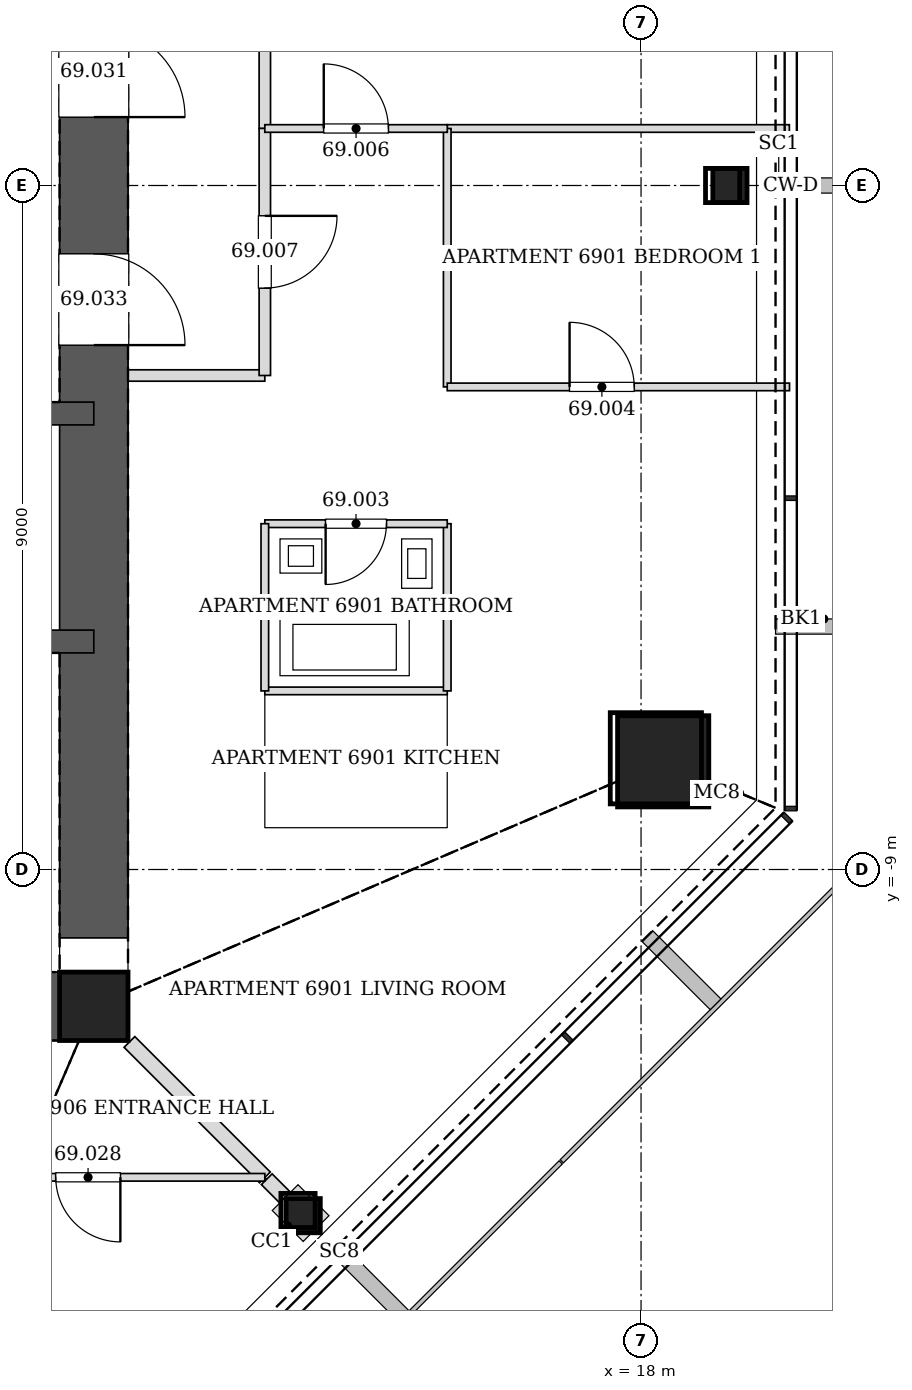
"""IFC4 building model, lengths in metres.
Left out: names, types, materials, properties, quantities, classifications, styles, units other than length and angle.
Written with IfcOpenShell. Run it as: python <this file> out.ifc"""

import sys

from ifc_helpers import new_model, si_unit, direction, frame, frame_2d, origin, origin_2d, place, context, subcontext, project, spatial, rectangle, hollow_rectangle, extrude, element, fill, save


model = new_model("IFC4")
c1 = context("Model", 3, precision=1e-05, world=origin(), true_north=direction((0.0, 1.0)))
c2 = subcontext(c1, "Body", "Model", "MODEL_VIEW")
j1 = project(units=[si_unit("LENGTHUNIT", "METRE"), si_unit("PLANEANGLEUNIT", "RADIAN")], contexts=[c1])
p1 = place(None, origin())
s1 = spatial("IfcSite", under=j1, at=p1, CompositionType="ELEMENT")
p2 = place(p1, origin())
s2 = spatial("IfcBuilding", under=s1, at=p2, CompositionType="ELEMENT")
p3 = place(p2, frame((0.0, 0.0, 284.4)))
s3 = spatial("IfcBuildingStorey", under=s2, at=p3, CompositionType="ELEMENT", Elevation=284.4)
p4 = place(p3, frame((18.291, -7.576, 0.0), z_axis=(-0.028277121884, 0.011698403216, 0.999531666202), x_axis=(-0.382282742426, -0.924045401938, 0.0)))
e1 = element("IfcColumn", 1, at=p4, inside=s3, PredefinedType="COLUMN", context=c2, shape_type="SweptSolid", body=[
    extrude(hollow_rectangle(XDim=1.2, YDim=1.2, WallThickness=0.055, at=origin_2d()), origin(), (0.0, 0.0, 1.0), 3.402),
])
for number, where, z_axis, x_axis in (
    (2, (19.169, 0.0, 0.0), (-0.028, 0.0, 1.0), (0.0, -1.0, 0.0)),
    (3, (13.555, -13.555, 0.0), (-0.02, 0.02, 1.0), (-0.707, -0.707, 0.0)),
):
    element("IfcColumn", number, at=place(p3, frame(where, z_axis=z_axis, x_axis=x_axis)), inside=s3, PredefinedType="COLUMN", context=c2, shape_type="SweptSolid", body=[
        extrude(hollow_rectangle(XDim=0.45, YDim=0.45, WallThickness=0.02, at=origin_2d()), origin(), (0.0, 0.0, 1.0), 3.402),
    ])
p5 = place(p3, frame((10.8, -10.8, 0.0), z_axis=(0.0, 0.0, 1.0), x_axis=(1.0, 0.0, 0.0)))
e4 = element("IfcColumn", 4, at=p5, inside=s3, PredefinedType="COLUMN", context=c2, shape_type="SweptSolid", body=[
    extrude(hollow_rectangle(XDim=0.9, YDim=0.9, WallThickness=0.04, at=origin_2d()), origin(), (0.0, 0.0, 1.0), 3.4),
])
p6 = place(p3, frame((-10.8, -10.8, 0.0), z_axis=(0.0, 0.0, 1.0), x_axis=(1.0, 0.0, 0.0)))
e5 = element("IfcWall", 5, at=p6, inside=s3, PredefinedType="SOLIDWALL", context=c2, shape_type="SweptSolid", body=[
    extrude(rectangle(XDim=21.6, YDim=0.9, at=frame_2d((10.8, 0.0))), origin(), (0.0, 0.0, 1.0), 3.4),
])
p7 = place(p6, frame((10.05, 0.0, 0.0)))
e6 = element("IfcOpeningElement", 6, at=p7, cuts=e5, PredefinedType="OPENING", context=c2, shape_type="SweptSolid", body=[
    extrude(rectangle(XDim=1.5, YDim=2.1, at=frame_2d((0.75, 1.05))), frame((0.0, 0.46, 0.0), z_axis=(0.0, -1.0, 0.0), x_axis=(1.0, 0.0, 0.0)), (0.0, 0.0, 1.0), 0.92),
])
p8 = place(p6, frame((17.1, 0.0, 0.0)))
e7 = element("IfcOpeningElement", 7, at=p8, cuts=e5, PredefinedType="OPENING", context=c2, shape_type="SweptSolid", body=[
    extrude(rectangle(XDim=0.9, YDim=2.1, at=frame_2d((0.45, 1.05))), frame((0.0, 0.46, 0.0), z_axis=(0.0, -1.0, 0.0), x_axis=(1.0, 0.0, 0.0)), (0.0, 0.0, 1.0), 0.92),
])
p9 = place(p3, frame((10.8, -10.8, 0.0), z_axis=(0.0, 0.0, 1.0), x_axis=(0.0, 1.0, 0.0)))
e8 = element("IfcWall", 8, at=p9, inside=s3, PredefinedType="SOLIDWALL", context=c2, shape_type="SweptSolid", body=[
    extrude(rectangle(XDim=21.6, YDim=0.9, at=frame_2d((10.8, 0.0))), origin(), (0.0, 0.0, 1.0), 3.4),
])
p10 = place(p9, frame((11.7, 0.0, 0.0)))
e9 = element("IfcOpeningElement", 9, at=p10, cuts=e8, PredefinedType="OPENING", context=c2, shape_type="SweptSolid", body=[
    extrude(rectangle(XDim=1.2, YDim=2.1, at=frame_2d((0.6, 1.05))), frame((0.0, 0.46, 0.0), z_axis=(0.0, -1.0, 0.0), x_axis=(1.0, 0.0, 0.0)), (0.0, 0.0, 1.0), 0.92),
])
p11 = place(p9, frame((8.7, 0.0, 0.0)))
e10 = element("IfcOpeningElement", 10, at=p11, cuts=e8, PredefinedType="OPENING", context=c2, shape_type="SweptSolid", body=[
    extrude(rectangle(XDim=1.2, YDim=2.1, at=frame_2d((0.6, 1.05))), frame((0.0, 0.46, 0.0), z_axis=(0.0, -1.0, 0.0), x_axis=(1.0, 0.0, 0.0)), (0.0, 0.0, 1.0), 0.92),
])
p12 = place(p3, frame((-10.8, -3.0, 0.0), z_axis=(0.0, 0.0, 1.0), x_axis=(1.0, 0.0, 0.0)))
e11 = element("IfcWall", 11, at=p12, inside=s3, PredefinedType="SOLIDWALL", context=c2, shape_type="SweptSolid", body=[
    extrude(rectangle(XDim=21.6, YDim=0.3, at=frame_2d((10.8, 0.0))), origin(), (0.0, 0.0, 1.0), 3.4),
])
p13 = place(p12, frame((13.25, 0.0, 0.0)))
e12 = element("IfcOpeningElement", 12, at=p13, cuts=e11, PredefinedType="OPENING", context=c2, shape_type="SweptSolid", body=[
    extrude(rectangle(XDim=0.9, YDim=2.1, at=frame_2d((0.45, 1.05))), frame((0.0, 0.16, 0.0), z_axis=(0.0, -1.0, 0.0), x_axis=(1.0, 0.0, 0.0)), (0.0, 0.0, 1.0), 0.32),
])
p14 = place(p12, frame((1.65, 0.0, 0.0)))
e13 = element("IfcOpeningElement", 13, at=p14, cuts=e11, PredefinedType="OPENING", context=c2, shape_type="SweptSolid", body=[
    extrude(rectangle(XDim=0.9, YDim=2.1, at=frame_2d((0.45, 1.05))), frame((0.0, 0.16, 0.0), z_axis=(0.0, -1.0, 0.0), x_axis=(1.0, 0.0, 0.0)), (0.0, 0.0, 1.0), 0.32),
])
p15 = place(p12, frame((4.55, 0.0, 0.0)))
e14 = element("IfcOpeningElement", 14, at=p15, cuts=e11, PredefinedType="OPENING", context=c2, shape_type="SweptSolid", body=[
    extrude(rectangle(XDim=0.9, YDim=2.1, at=frame_2d((0.45, 1.05))), frame((0.0, 0.16, 0.0), z_axis=(0.0, -1.0, 0.0), x_axis=(1.0, 0.0, 0.0)), (0.0, 0.0, 1.0), 0.32),
])
p16 = place(p12, frame((7.45, 0.0, 0.0)))
e15 = element("IfcOpeningElement", 15, at=p16, cuts=e11, PredefinedType="OPENING", context=c2, shape_type="SweptSolid", body=[
    extrude(rectangle(XDim=0.9, YDim=2.1, at=frame_2d((0.45, 1.05))), frame((0.0, 0.16, 0.0), z_axis=(0.0, -1.0, 0.0), x_axis=(1.0, 0.0, 0.0)), (0.0, 0.0, 1.0), 0.32),
])
p17 = place(p12, frame((16.05, 0.0, 0.0)))
e16 = element("IfcOpeningElement", 16, at=p17, cuts=e11, PredefinedType="OPENING", context=c2, shape_type="SweptSolid", body=[
    extrude(rectangle(XDim=1.1, YDim=2.1, at=frame_2d((0.55, 1.05))), frame((0.0, 0.16, 0.0), z_axis=(0.0, -1.0, 0.0), x_axis=(1.0, 0.0, 0.0)), (0.0, 0.0, 1.0), 0.32),
])
p18 = place(p12, frame((18.95, 0.0, 0.0)))
e17 = element("IfcOpeningElement", 17, at=p18, cuts=e11, PredefinedType="OPENING", context=c2, shape_type="SweptSolid", body=[
    extrude(rectangle(XDim=1.1, YDim=2.1, at=frame_2d((0.55, 1.05))), frame((0.0, 0.16, 0.0), z_axis=(0.0, -1.0, 0.0), x_axis=(1.0, 0.0, 0.0)), (0.0, 0.0, 1.0), 0.32),
])
p19 = place(p3, frame((-10.8, -6.0, 0.0), z_axis=(0.0, 0.0, 1.0), x_axis=(1.0, 0.0, 0.0)))
e18 = element("IfcWall", 18, at=p19, inside=s3, PredefinedType="SOLIDWALL", context=c2, shape_type="SweptSolid", body=[
    extrude(rectangle(XDim=21.6, YDim=0.3, at=frame_2d((10.8, 0.0))), origin(), (0.0, 0.0, 1.0), 3.4),
])
p20 = place(p19, frame((10.25, 0.0, 0.0)))
e19 = element("IfcOpeningElement", 19, at=p20, cuts=e18, PredefinedType="OPENING", context=c2, shape_type="SweptSolid", body=[
    extrude(rectangle(XDim=1.1, YDim=2.1, at=frame_2d((0.55, 1.05))), frame((0.0, 0.16, 0.0), z_axis=(0.0, -1.0, 0.0), x_axis=(1.0, 0.0, 0.0)), (0.0, 0.0, 1.0), 0.32),
])
p21 = place(p3, frame((13.05, 0.749, 0.0), z_axis=(0.0, 0.0, 1.0), x_axis=(0.0, 1.0, 0.0)))
e20 = element("IfcWall", 20, at=p21, inside=s3, PredefinedType="PARTITIONING", context=c2, shape_type="SweptSolid", body=[
    extrude(rectangle(XDim=1.502, YDim=0.15, at=frame_2d((0.751, 0.0))), origin(), (0.0, 0.0, 1.0), 3.2),
])
p22 = place(p3, frame((11.25, -2.5, 0.0), z_axis=(0.0, 0.0, 1.0), x_axis=(1.0, 0.0, 0.0)))
e21 = element("IfcWall", 21, at=p22, inside=s3, PredefinedType="PARTITIONING", context=c2, shape_type="SweptSolid", body=[
    extrude(rectangle(XDim=1.8, YDim=0.15, at=frame_2d((0.9, 0.0))), origin(), (0.0, 0.0, 1.0), 3.2),
])
p23 = place(p3, frame((13.05, -2.5, 0.0), z_axis=(0.0, 0.0, 1.0), x_axis=(0.0, 1.0, 0.0)))
e22 = element("IfcWall", 22, at=p23, inside=s3, PredefinedType="PARTITIONING", context=c2, shape_type="SweptSolid", body=[
    extrude(rectangle(XDim=3.251, YDim=0.15, at=frame_2d((1.625, 0.0))), origin(), (0.0, 0.0, 1.0), 2.349),
])
p24 = place(p23, frame((1.15, 0.0, 0.0)))
e23 = element("IfcOpeningElement", 23, at=p24, cuts=e22, PredefinedType="OPENING", context=c2, shape_type="SweptSolid", body=[
    extrude(rectangle(XDim=0.95, YDim=2.1, at=frame_2d((0.475, 1.05))), frame((0.0, 0.085, 0.0), z_axis=(0.0, -1.0, 0.0), x_axis=(1.0, 0.0, 0.0)), (0.0, 0.0, 1.0), 0.17),
])
p25 = place(p3, frame((15.45, -6.65, 0.0), z_axis=(0.0, 0.0, 1.0), x_axis=(-1.0, 0.0, 0.0)))
e24 = element("IfcWall", 24, at=p25, inside=s3, PredefinedType="PARTITIONING", context=c2, shape_type="SweptSolid", body=[
    extrude(rectangle(XDim=2.4, YDim=0.1, at=frame_2d((1.2, 0.0))), origin(), (0.0, 0.0, 1.0), 2.591),
])
p26 = place(p3, frame((15.45, -6.65, 0.0), z_axis=(0.0, 0.0, 1.0), x_axis=(0.0, 1.0, 0.0)))
e25 = element("IfcWall", 25, at=p26, inside=s3, PredefinedType="PARTITIONING", context=c2, shape_type="SweptSolid", body=[
    extrude(rectangle(XDim=2.2, YDim=0.1, at=frame_2d((1.1, 0.0))), origin(), (0.0, 0.0, 1.0), 3.2),
])
p27 = place(p3, frame((15.45, -4.45, 0.0), z_axis=(0.0, 0.0, 1.0), x_axis=(-1.0, 0.0, 0.0)))
e26 = element("IfcWall", 26, at=p27, inside=s3, PredefinedType="PARTITIONING", context=c2, shape_type="SweptSolid", body=[
    extrude(rectangle(XDim=2.4, YDim=0.1, at=frame_2d((1.2, 0.0))), origin(), (0.0, 0.0, 1.0), 2.591),
])
p28 = place(p27, frame((0.8, 0.0, 0.0)))
e27 = element("IfcOpeningElement", 27, at=p28, cuts=e26, PredefinedType="OPENING", context=c2, shape_type="SweptSolid", body=[
    extrude(rectangle(XDim=0.8, YDim=2.1, at=frame_2d((0.4, 1.05))), frame((0.0, 0.06, 0.0), z_axis=(0.0, -1.0, 0.0), x_axis=(1.0, 0.0, 0.0)), (0.0, 0.0, 1.0), 0.12),
])
p29 = place(p3, frame((13.05, -4.45, 0.0), z_axis=(0.0, 0.0, 1.0), x_axis=(0.0, -1.0, 0.0)))
e28 = element("IfcWall", 28, at=p29, inside=s3, PredefinedType="PARTITIONING", context=c2, shape_type="SweptSolid", body=[
    extrude(rectangle(XDim=2.2, YDim=0.1, at=frame_2d((1.1, 0.0))), origin(), (0.0, 0.0, 1.0), 3.2),
])
p30 = place(p3, frame((19.951, 0.75, 0.0), z_axis=(0.0, 0.0, 1.0), x_axis=(-1.0, 0.0, 0.0)))
e29 = element("IfcWall", 29, at=p30, inside=s3, PredefinedType="PARTITIONING", context=c2, shape_type="SweptSolid", body=[
    extrude(rectangle(XDim=4.501, YDim=0.1, at=frame_2d((2.251, 0.0))), origin(), (0.0, 0.0, 1.0), 2.591),
])
p31 = place(p3, frame((15.45, 0.75, 0.0), z_axis=(0.0, 0.0, 1.0), x_axis=(0.0, -1.0, 0.0)))
e30 = element("IfcWall", 30, at=p31, inside=s3, PredefinedType="PARTITIONING", context=c2, shape_type="SweptSolid", body=[
    extrude(rectangle(XDim=3.4, YDim=0.1, at=frame_2d((1.7, 0.0))), origin(), (0.0, 0.0, 1.0), 2.349),
])
p32 = place(p3, frame((15.45, -2.65, 0.0), z_axis=(0.0, 0.0, 1.0), x_axis=(1.0, 0.0, 0.0)))
e31 = element("IfcWall", 31, at=p32, inside=s3, PredefinedType="PARTITIONING", context=c2, shape_type="SweptSolid", body=[
    extrude(rectangle(XDim=4.503, YDim=0.1, at=frame_2d((2.252, 0.0))), origin(), (0.0, 0.0, 1.0), 2.591),
])
p33 = place(p32, frame((1.61, 0.0, 0.0)))
e32 = element("IfcOpeningElement", 32, at=p33, cuts=e31, PredefinedType="OPENING", context=c2, shape_type="SweptSolid", body=[
    extrude(rectangle(XDim=0.85, YDim=2.1, at=frame_2d((0.425, 1.05))), frame((0.0, 0.06, 0.0), z_axis=(0.0, -1.0, 0.0), x_axis=(1.0, 0.0, 0.0)), (0.0, 0.0, 1.0), 0.12),
])
p34 = place(p3, frame((13.05, 0.75, 0.0), z_axis=(0.0, 0.0, 1.0), x_axis=(1.0, 0.0, 0.0)))
e33 = element("IfcWall", 33, at=p34, inside=s3, PredefinedType="PARTITIONING", context=c2, shape_type="SweptSolid", body=[
    extrude(rectangle(XDim=2.401, YDim=0.1, at=frame_2d((1.2, 0.0))), origin(), (0.0, 0.0, 1.0), 2.591),
])
p35 = place(p34, frame((0.775, 0.0, 0.0)))
e34 = element("IfcOpeningElement", 34, at=p35, cuts=e33, PredefinedType="OPENING", context=c2, shape_type="SweptSolid", body=[
    extrude(rectangle(XDim=0.85, YDim=2.1, at=frame_2d((0.425, 1.05))), frame((0.0, 0.06, 0.0), z_axis=(0.0, -1.0, 0.0), x_axis=(1.0, 0.0, 0.0)), (0.0, 0.0, 1.0), 0.12),
])
p36 = place(p3, frame((13.075, -13.075, 0.0), z_axis=(0.0, 0.0, 1.0), x_axis=(0.707106781187, -0.707106781187, 0.0)))
e35 = element("IfcWall", 35, at=p36, inside=s3, PredefinedType="PARTITIONING", context=c2, shape_type="SweptSolid", body=[
    extrude(rectangle(XDim=0.338, YDim=0.2, at=frame_2d((0.169, 0.0))), origin(), (0.0, 0.0, 1.0), 2.591),
])
p37 = place(p3, frame((11.269, -11.269, 0.0), z_axis=(0.0, 0.0, 1.0), x_axis=(0.707106781187, -0.707106781187, 0.0)))
e36 = element("IfcWall", 36, at=p37, inside=s3, PredefinedType="PARTITIONING", context=c2, shape_type="SweptSolid", body=[
    extrude(rectangle(XDim=2.52, YDim=0.2, at=frame_2d((1.26, 0.0))), origin(), (0.0, 0.0, 1.0), 2.591),
])
p38 = place(p3, frame((13.05, -13.05, 0.0), z_axis=(0.0, 0.0, 1.0), x_axis=(-1.0, 0.0, 0.0)))
e37 = element("IfcWall", 37, at=p38, inside=s3, PredefinedType="PARTITIONING", context=c2, shape_type="SweptSolid", body=[
    extrude(rectangle(XDim=4.651, YDim=0.1, at=frame_2d((2.326, 0.0))), origin(), (0.0, 0.0, 1.0), 2.497),
])
p39 = place(p38, frame((1.9, 0.0, 0.0)))
e38 = element("IfcOpeningElement", 38, at=p39, cuts=e37, PredefinedType="OPENING", context=c2, shape_type="SweptSolid", body=[
    extrude(rectangle(XDim=0.85, YDim=2.1, at=frame_2d((0.425, 1.05))), frame((0.0, 0.06, 0.0), z_axis=(0.0, -1.0, 0.0), x_axis=(1.0, 0.0, 0.0)), (0.0, 0.0, 1.0), 0.12),
])
p40 = place(p28, origin())
e39 = element("IfcDoor", 39, at=p40, inside=s3, OperationType="SINGLE_SWING_RIGHT", PredefinedType="DOOR", context=c2, shape_type="SweptSolid", body=[
    extrude(rectangle(XDim=0.8, YDim=2.1, at=frame_2d((0.4, 1.05))), frame((0.0, 0.025, 0.0), z_axis=(0.0, -1.0, 0.0), x_axis=(1.0, 0.0, 0.0)), (0.0, 0.0, 1.0), 0.05),
])
fill(e27, e39)
p41 = place(p33, origin())
e40 = element("IfcDoor", 40, at=p41, inside=s3, OperationType="SINGLE_SWING_LEFT", PredefinedType="DOOR", context=c2, shape_type="SweptSolid", body=[
    extrude(rectangle(XDim=0.85, YDim=2.1, at=frame_2d((0.425, 1.05))), frame((0.0, 0.025, 0.0), z_axis=(0.0, -1.0, 0.0), x_axis=(1.0, 0.0, 0.0)), (0.0, 0.0, 1.0), 0.05),
])
fill(e32, e40)
p42 = place(p35, origin())
e41 = element("IfcDoor", 41, at=p42, inside=s3, OperationType="SINGLE_SWING_LEFT", PredefinedType="DOOR", context=c2, shape_type="SweptSolid", body=[
    extrude(rectangle(XDim=0.85, YDim=2.1, at=frame_2d((0.425, 1.05))), frame((0.0, 0.025, 0.0), z_axis=(0.0, -1.0, 0.0), x_axis=(1.0, 0.0, 0.0)), (0.0, 0.0, 1.0), 0.05),
])
fill(e34, e41)
p43 = place(p24, frame((0.95, 0.0, 0.0), z_axis=(0.0, 0.0, 1.0), x_axis=(-1.0, 0.0, 0.0)))
e42 = element("IfcDoor", 42, at=p43, inside=s3, OperationType="SINGLE_SWING_LEFT", PredefinedType="DOOR", context=c2, shape_type="SweptSolid", body=[
    extrude(rectangle(XDim=0.95, YDim=2.1, at=frame_2d((0.475, 1.05))), frame((0.0, 0.025, 0.0), z_axis=(0.0, -1.0, 0.0), x_axis=(1.0, 0.0, 0.0)), (0.0, 0.0, 1.0), 0.05),
])
fill(e23, e42)
p44 = place(p39, origin())
e43 = element("IfcDoor", 43, at=p44, inside=s3, OperationType="SINGLE_SWING_LEFT", PredefinedType="DOOR", context=c2, shape_type="SweptSolid", body=[
    extrude(rectangle(XDim=0.85, YDim=2.1, at=frame_2d((0.425, 1.05))), frame((0.0, 0.025, 0.0), z_axis=(0.0, -1.0, 0.0), x_axis=(1.0, 0.0, 0.0)), (0.0, 0.0, 1.0), 0.05),
])
fill(e38, e43)
p45 = place(p10, frame((1.2, 0.0, 0.0), z_axis=(0.0, 0.0, 1.0), x_axis=(-1.0, 0.0, 0.0)))
e44 = element("IfcDoor", 44, at=p45, inside=s3, OperationType="SINGLE_SWING_RIGHT", PredefinedType="DOOR", context=c2, shape_type="SweptSolid", body=[
    extrude(rectangle(XDim=1.2, YDim=2.1, at=frame_2d((0.6, 1.05))), frame((0.0, 0.025, 0.0), z_axis=(0.0, -1.0, 0.0), x_axis=(1.0, 0.0, 0.0)), (0.0, 0.0, 1.0), 0.05),
])
fill(e9, e44)
p46 = place(p11, frame((1.2, 0.0, 0.0), z_axis=(0.0, 0.0, 1.0), x_axis=(-1.0, 0.0, 0.0)))
e45 = element("IfcDoor", 45, at=p46, inside=s3, OperationType="SINGLE_SWING_RIGHT", PredefinedType="DOOR", context=c2, shape_type="SweptSolid", body=[
    extrude(rectangle(XDim=1.2, YDim=2.1, at=frame_2d((0.6, 1.05))), frame((0.0, 0.025, 0.0), z_axis=(0.0, -1.0, 0.0), x_axis=(1.0, 0.0, 0.0)), (0.0, 0.0, 1.0), 0.05),
])
fill(e10, e45)
save(model, sys.argv[1])
